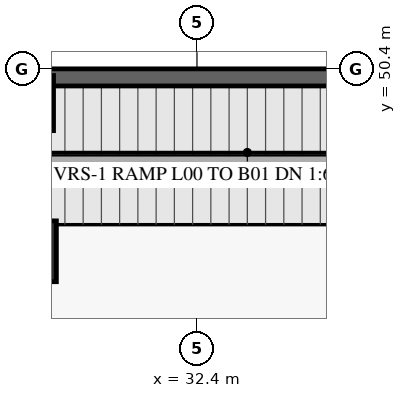
"""IFC4 building model, lengths in metres.
Left out: names, types, materials, properties, quantities, classifications, styles, units other than length and angle.
Written with IfcOpenShell. Run it as: python <this file> out.ifc"""

import sys

from ifc_helpers import new_model, si_unit, direction, frame, frame_2d, origin, origin_2d, place, context, subcontext, project, spatial, rectangle, extrude, source, transform, mapped, element, save


model = new_model("IFC4")
c1 = context("Model", 3, precision=1e-05, world=origin(), true_north=direction((0.0, 1.0)))
c2 = subcontext(c1, "Body", "Model", "MODEL_VIEW")
j1 = project(units=[si_unit("LENGTHUNIT", "METRE"), si_unit("PLANEANGLEUNIT", "RADIAN")], contexts=[c1])
p1 = place(None, origin())
s1 = spatial("IfcSite", under=j1, at=p1, CompositionType="ELEMENT")
p2 = place(p1, origin())
s2 = spatial("IfcBuilding", under=s1, at=p2, CompositionType="ELEMENT")
p3 = place(p2, frame((0.0, 0.0, -10.8)))
s3 = spatial("IfcBuildingStorey", under=s2, at=p3, CompositionType="ELEMENT", Elevation=-10.8)
p4 = place(p3, frame((64.575, 50.175, 0.0), z_axis=(0.0, 0.0, 1.0), x_axis=(-1.0, 0.0, 0.0)))
e1 = element("IfcWall", 1, at=p4, inside=s3, PredefinedType="USERDEFINED", context=c2, shape_type="SweptSolid", body=[
    extrude(rectangle(XDim=64.35, YDim=0.45, at=frame_2d((32.175, 0.0))), origin(), (0.0, 0.0, 1.0), 3.238),
])
m1 = source(origin(), c2, "Body", "SweptSolid", [
    extrude(rectangle(XDim=1.6, YDim=1.6, at=origin_2d()), origin(), (0.0, 0.0, 1.0), 3.24),
])
p5 = place(p3, frame((27.9, 45.6, 0.0), z_axis=(0.0, 0.0, 1.0), x_axis=(1.0, 0.0, 0.0)))
e2 = element("IfcColumn", 2, at=p5, inside=s3, PredefinedType="COLUMN", context=c2, shape_type="MappedRepresentation", body=[
    mapped(m1, transform((0.0, 0.0, 0.0), scale=1.0)),
])
m2 = source(origin(), c2, "Body", "SweptSolid", [
    extrude(rectangle(XDim=1.45, YDim=1.45, at=origin_2d()), origin(), (0.0, 0.0, 1.0), 3.24),
])
p6 = place(p3, frame((27.9, 49.5, 0.0), z_axis=(0.0, 0.0, 1.0), x_axis=(1.0, 0.0, 0.0)))
e3 = element("IfcColumn", 3, at=p6, inside=s3, PredefinedType="COLUMN", context=c2, shape_type="MappedRepresentation", body=[
    mapped(m2, transform((0.0, 0.0, 0.0), scale=1.0)),
])
save(model, sys.argv[1])
